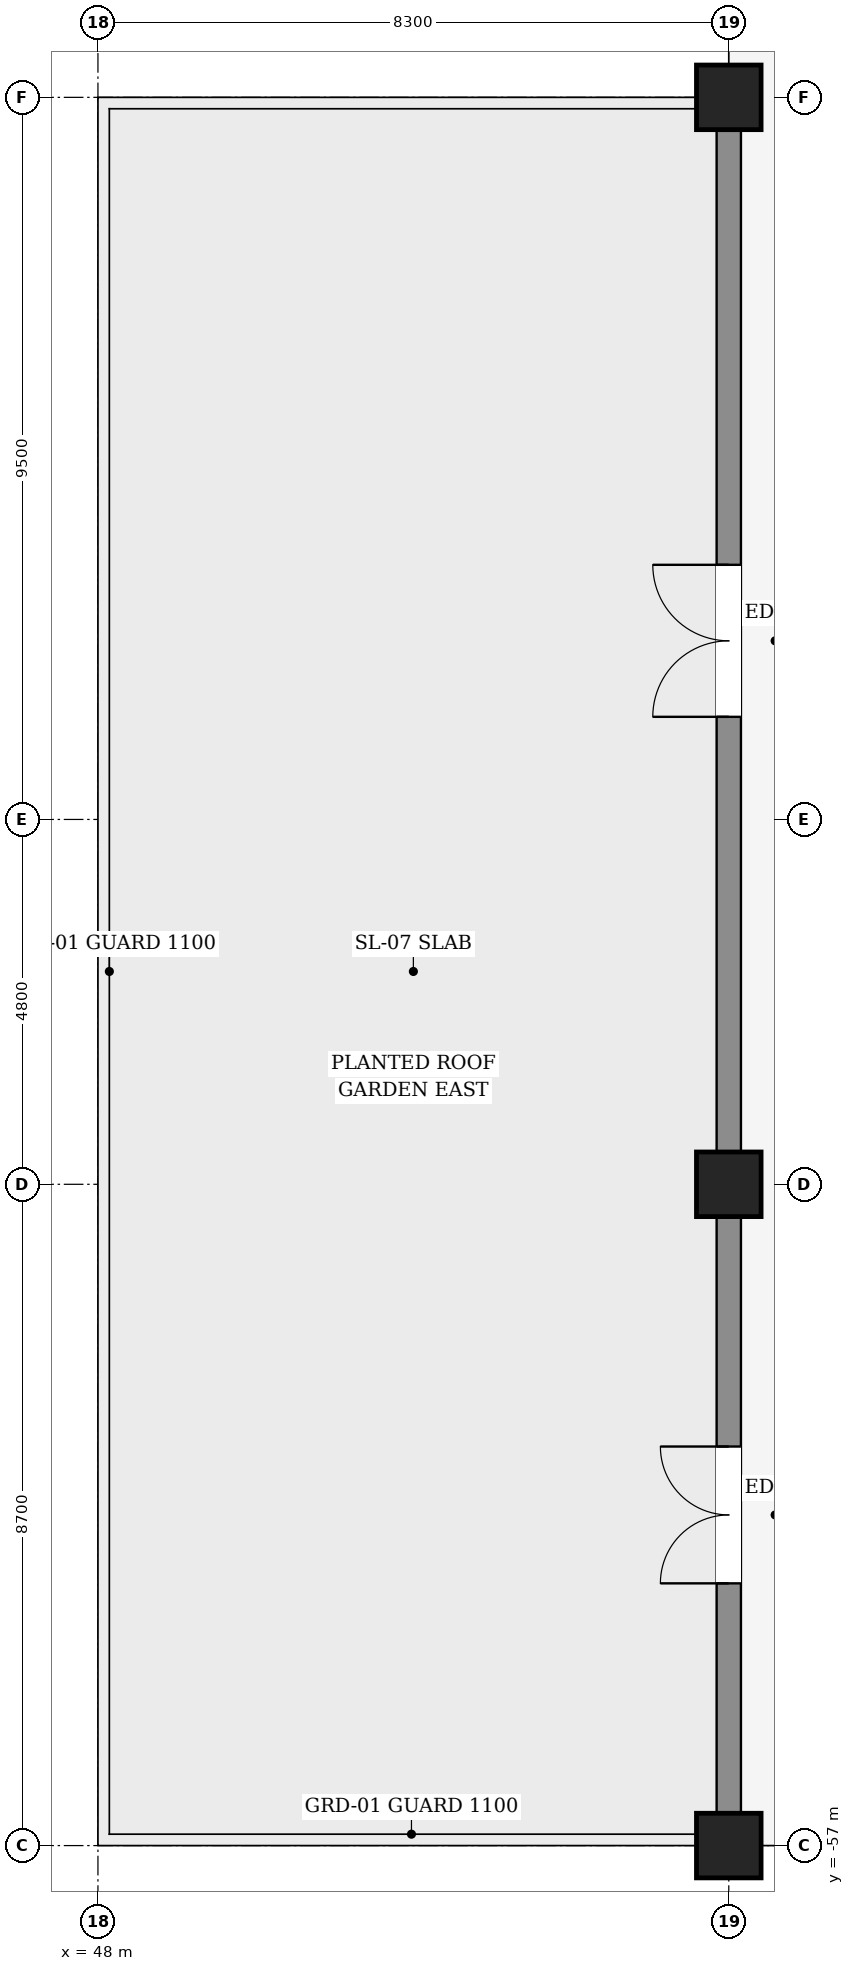
"""IFC4 building model, lengths in metres.
Left out: names, types, materials, properties, quantities, classifications, styles, units other than length and angle.
Written with IfcOpenShell. Run it as: python <this file> out.ifc"""

import sys

from ifc_helpers import new_model, si_unit, direction, frame, frame_2d, origin, origin_2d, place, context, subcontext, project, spatial, rectangle, extrude, element, fill, save


model = new_model("IFC4")
c1 = context("Model", 3, precision=1e-05, world=origin(), true_north=direction((0.0, 1.0)))
c2 = subcontext(c1, "Body", "Model", "MODEL_VIEW")
j1 = project(units=[si_unit("LENGTHUNIT", "METRE"), si_unit("PLANEANGLEUNIT", "RADIAN")], contexts=[c1])
p1 = place(None, origin())
s1 = spatial("IfcSite", under=j1, at=p1, CompositionType="ELEMENT")
p2 = place(p1, origin())
s2 = spatial("IfcBuilding", under=s1, at=p2, CompositionType="ELEMENT")
p3 = place(p2, frame((0.0, 0.0, 16.2)))
s3 = spatial("IfcBuildingStorey", under=s2, at=p3, CompositionType="ELEMENT", Elevation=16.2)
for number, where, z_axis, x_axis in (
    (1, (56.3, -57.0, 0.0), (0.0, 0.0, 1.0), (1.0, 0.0, 0.0)),
    (2, (56.3, -48.3, 0.0), (0.0, 0.0, 1.0), (1.0, 0.0, 0.0)),
    (3, (56.3, -34.0, 0.0), (0.0, 0.0, 1.0), (1.0, 0.0, 0.0)),
):
    element("IfcColumn", number, at=place(p3, frame(where, z_axis=z_axis, x_axis=x_axis)), inside=s3, PredefinedType="COLUMN", context=c2, shape_type="SweptSolid", body=[
        extrude(rectangle(XDim=0.85, YDim=0.85, at=origin_2d()), origin(), (0.0, 0.0, 1.0), 4.8),
    ])
p4 = place(p3, frame((56.3, -56.593, 0.0), z_axis=(0.0, 0.0, 1.0), x_axis=(0.0, 1.0, 0.0)))
e4 = element("IfcWall", 4, at=p4, inside=s3, PredefinedType="SOLIDWALL", context=c2, shape_type="SweptSolid", body=[
    extrude(rectangle(XDim=7.886, YDim=0.32, at=frame_2d((3.943, 0.0))), origin(), (0.0, 0.0, 1.0), 3.8),
])
p5 = place(p4, frame((3.043, 0.0, 0.0)))
e5 = element("IfcOpeningElement", 5, at=p5, cuts=e4, PredefinedType="OPENING", context=c2, shape_type="SweptSolid", body=[
    extrude(rectangle(XDim=1.8, YDim=2.4, at=frame_2d((0.9, 1.2))), frame((0.0, 0.17, 0.0), z_axis=(0.0, -1.0, 0.0), x_axis=(1.0, 0.0, 0.0)), (0.0, 0.0, 1.0), 0.34),
])
p6 = place(p3, frame((56.3, -47.893, 0.0), z_axis=(0.0, 0.0, 1.0), x_axis=(0.0, 1.0, 0.0)))
e6 = element("IfcWall", 6, at=p6, inside=s3, PredefinedType="SOLIDWALL", context=c2, shape_type="SweptSolid", body=[
    extrude(rectangle(XDim=13.486, YDim=0.32, at=frame_2d((6.743, 0.0))), origin(), (0.0, 0.0, 1.0), 3.977),
])
p7 = place(p6, frame((5.743, 0.0, 0.0)))
e7 = element("IfcOpeningElement", 7, at=p7, cuts=e6, PredefinedType="OPENING", context=c2, shape_type="SweptSolid", body=[
    extrude(rectangle(XDim=2.0, YDim=2.4, at=frame_2d((1.0, 1.2))), frame((0.0, 0.17, 0.0), z_axis=(0.0, -1.0, 0.0), x_axis=(1.0, 0.0, 0.0)), (0.0, 0.0, 1.0), 0.34),
])
p8 = place(p5, origin())
e8 = element("IfcDoor", 8, at=p8, inside=s3, OperationType="DOUBLE_DOOR_SINGLE_SWING", PredefinedType="DOOR", context=c2, shape_type="SweptSolid", body=[
    extrude(rectangle(XDim=1.8, YDim=2.4, at=frame_2d((0.9, 1.2))), frame((0.0, 0.025, 0.0), z_axis=(0.0, -1.0, 0.0), x_axis=(1.0, 0.0, 0.0)), (0.0, 0.0, 1.0), 0.05),
])
fill(e5, e8)
p9 = place(p7, origin())
e9 = element("IfcDoor", 9, at=p9, inside=s3, OperationType="DOUBLE_DOOR_SINGLE_SWING", PredefinedType="DOOR", context=c2, shape_type="SweptSolid", body=[
    extrude(rectangle(XDim=2.0, YDim=2.4, at=frame_2d((1.0, 1.2))), frame((0.0, 0.025, 0.0), z_axis=(0.0, -1.0, 0.0), x_axis=(1.0, 0.0, 0.0)), (0.0, 0.0, 1.0), 0.05),
])
fill(e7, e9)
save(model, sys.argv[1])
